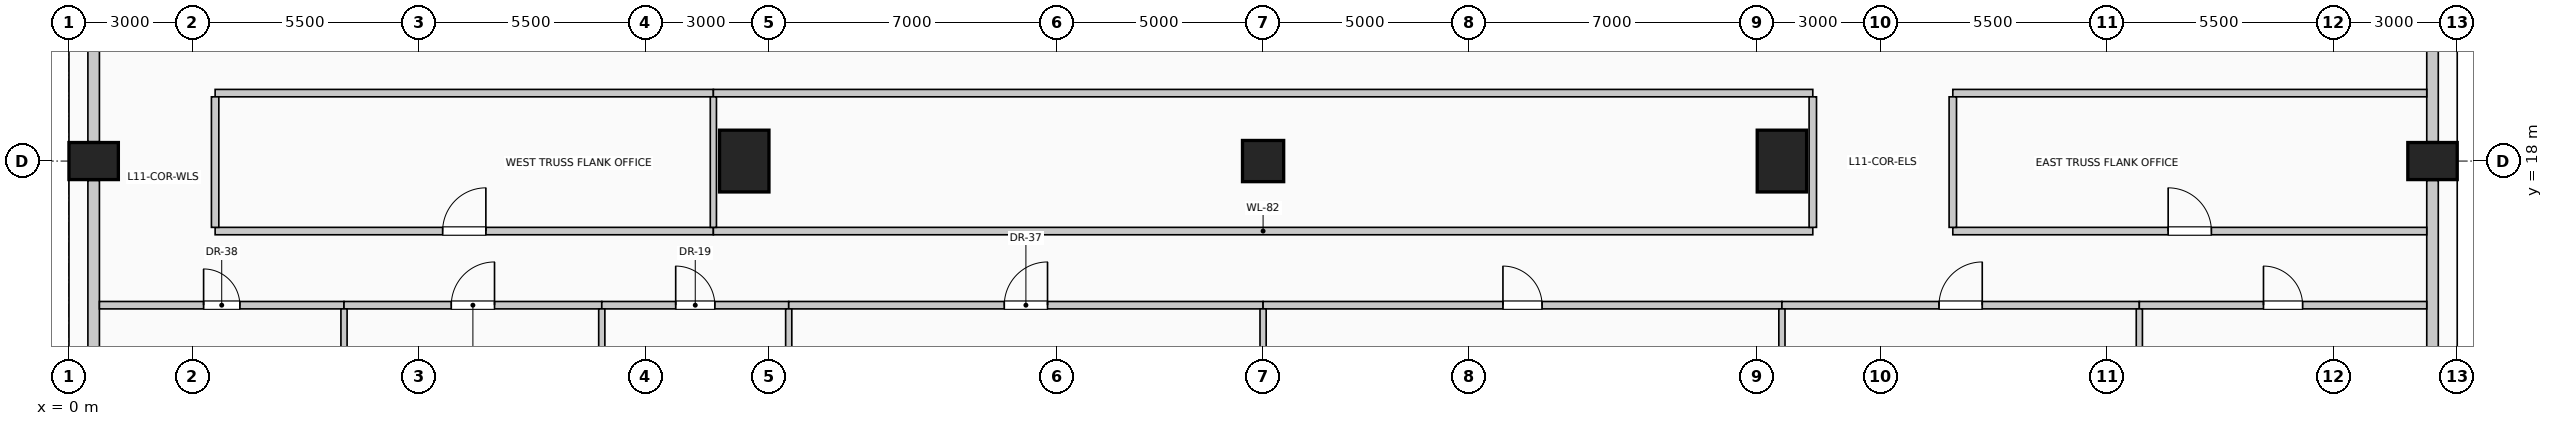
"""IFC4 building model, lengths in metres.
Left out: names, types, materials, properties, quantities, classifications, styles, units other than length and angle.
Written with IfcOpenShell. Run it as: python <this file> out.ifc"""

import sys

from ifc_helpers import new_model, si_unit, direction, frame, frame_2d, origin, origin_2d, place, context, subcontext, project, spatial, rectangle, circle, extrude, element, fill, save


model = new_model("IFC4")
c1 = context("Model", 3, precision=1e-05, world=origin(), true_north=direction((0.0, 1.0)))
c2 = subcontext(c1, "Body", "Model", "MODEL_VIEW")
j1 = project(units=[si_unit("LENGTHUNIT", "METRE"), si_unit("PLANEANGLEUNIT", "RADIAN")], contexts=[c1])
p1 = place(None, origin())
s1 = spatial("IfcSite", under=j1, at=p1, CompositionType="ELEMENT")
p2 = place(p1, origin())
s2 = spatial("IfcBuilding", under=s1, at=p2, CompositionType="ELEMENT")
p3 = place(p2, frame((0.0, 0.0, 46.6)))
s3 = spatial("IfcBuildingStorey", under=s2, at=p3, CompositionType="ELEMENT", Elevation=46.6)
for number, where, z_axis, x_axis in (
    (1, (0.6, 18.0, 0.0), (0.0, 0.0, 1.0), (0.0, 1.0, 0.0)),
    (2, (57.4, 18.0, 0.0), (0.0, 0.0, 1.0), (0.0, 1.0, 0.0)),
):
    element("IfcColumn", number, at=place(p3, frame(where, z_axis=z_axis, x_axis=x_axis)), inside=s3, PredefinedType="COLUMN", context=c2, shape_type="SweptSolid", body=[
        extrude(rectangle(XDim=0.9, YDim=1.2, at=origin_2d()), origin(), (0.0, 0.0, 1.0), 4.0),
    ])
for number, where, z_axis, x_axis in (
    (3, (16.4, 18.0, 0.0), (0.0, 0.0, 1.0), (1.0, 0.0, 0.0)),
    (4, (41.6, 18.0, 0.0), (0.0, 0.0, 1.0), (1.0, 0.0, 0.0)),
):
    element("IfcColumn", number, at=place(p3, frame(where, z_axis=z_axis, x_axis=x_axis)), inside=s3, PredefinedType="COLUMN", context=c2, shape_type="SweptSolid", body=[
        extrude(rectangle(XDim=1.2, YDim=1.5, at=origin_2d()), origin(), (0.0, 0.0, 1.0), 4.0),
    ])
p4 = place(p3, frame((29.0, 18.0, 0.0), z_axis=(0.0, 0.0, 1.0), x_axis=(1.0, 0.0, 0.0)))
e5 = element("IfcColumn", 5, at=p4, inside=s3, PredefinedType="COLUMN", context=c2, shape_type="SweptSolid", body=[
    extrude(circle(Radius=0.5, at=origin_2d()), origin(), (0.0, 0.0, 1.0), 4.0),
])
p5 = place(p3, frame((0.6, 10.47, 0.0), z_axis=(0.0, 0.0, 1.0), x_axis=(0.0, 1.0, 0.0)))
e6 = element("IfcWall", 6, at=p5, inside=s3, PredefinedType="SOLIDWALL", context=c2, shape_type="SweptSolid", body=[
    extrude(rectangle(XDim=7.06, YDim=0.28, at=frame_2d((3.53, 0.0))), origin(), (0.0, 0.0, 1.0), 2.85),
])
p6 = place(p5, frame((1.22, 0.0, 0.5)))
e7 = element("IfcOpeningElement", 7, at=p6, cuts=e6, PredefinedType="OPENING", context=c2, shape_type="SweptSolid", body=[
    extrude(rectangle(XDim=1.7, YDim=1.95, at=frame_2d((0.85, 0.975))), frame((0.0, 0.15, 0.0), z_axis=(0.0, -1.0, 0.0), x_axis=(1.0, 0.0, 0.0)), (0.0, 0.0, 1.0), 0.3),
])
p7 = place(p3, frame((0.6, 18.47, 0.0), z_axis=(0.0, 0.0, 1.0), x_axis=(0.0, 1.0, 0.0)))
e8 = element("IfcWall", 8, at=p7, inside=s3, PredefinedType="SOLIDWALL", context=c2, shape_type="SweptSolid", body=[
    extrude(rectangle(XDim=7.06, YDim=0.28, at=frame_2d((3.53, 0.0))), origin(), (0.0, 0.0, 1.0), 2.85),
])
p8 = place(p3, frame((57.4, 17.53, 0.0), z_axis=(0.0, 0.0, 1.0), x_axis=(0.0, -1.0, 0.0)))
e9 = element("IfcWall", 9, at=p8, inside=s3, PredefinedType="SOLIDWALL", context=c2, shape_type="SweptSolid", body=[
    extrude(rectangle(XDim=7.06, YDim=0.28, at=frame_2d((3.53, 0.0))), origin(), (0.0, 0.0, 1.0), 2.85),
])
p9 = place(p8, frame((4.14, 0.0, 0.5)))
e10 = element("IfcOpeningElement", 10, at=p9, cuts=e9, PredefinedType="OPENING", context=c2, shape_type="SweptSolid", body=[
    extrude(rectangle(XDim=1.7, YDim=1.95, at=frame_2d((0.85, 0.975))), frame((0.0, 0.15, 0.0), z_axis=(0.0, -1.0, 0.0), x_axis=(1.0, 0.0, 0.0)), (0.0, 0.0, 1.0), 0.3),
])
p10 = place(p3, frame((57.4, 25.53, 0.0), z_axis=(0.0, 0.0, 1.0), x_axis=(0.0, -1.0, 0.0)))
e11 = element("IfcWall", 11, at=p10, inside=s3, PredefinedType="SOLIDWALL", context=c2, shape_type="SweptSolid", body=[
    extrude(rectangle(XDim=7.06, YDim=0.28, at=frame_2d((3.53, 0.0))), origin(), (0.0, 0.0, 1.0), 2.85),
])
p11 = place(p3, frame((0.74, 14.5, 0.0), z_axis=(0.0, 0.0, 1.0), x_axis=(1.0, 0.0, 0.0)))
e12 = element("IfcWall", 12, at=p11, inside=s3, PredefinedType="PARTITIONING", context=c2, shape_type="SweptSolid", body=[
    extrude(rectangle(XDim=5.94, YDim=0.18, at=frame_2d((2.97, 0.0))), origin(), (0.0, 0.0, 1.0), 3.7),
])
p12 = place(p11, frame((2.53, 0.0, 0.0)))
e13 = element("IfcOpeningElement", 13, at=p12, cuts=e12, PredefinedType="OPENING", context=c2, shape_type="SweptSolid", body=[
    extrude(rectangle(XDim=0.88, YDim=2.1, at=frame_2d((0.44, 1.05))), frame((0.0, 0.1, 0.0), z_axis=(0.0, -1.0, 0.0), x_axis=(1.0, 0.0, 0.0)), (0.0, 0.0, 1.0), 0.2),
])
p13 = place(p3, frame((6.68, 14.5, 0.0), z_axis=(0.0, 0.0, 1.0), x_axis=(1.0, 0.0, 0.0)))
e14 = element("IfcWall", 14, at=p13, inside=s3, PredefinedType="PARTITIONING", context=c2, shape_type="SweptSolid", body=[
    extrude(rectangle(XDim=6.26, YDim=0.18, at=frame_2d((3.13, 0.0))), origin(), (0.0, 0.0, 1.0), 3.7),
])
p14 = place(p13, frame((2.605, 0.0, 0.0)))
e15 = element("IfcOpeningElement", 15, at=p14, cuts=e14, PredefinedType="OPENING", context=c2, shape_type="SweptSolid", body=[
    extrude(rectangle(XDim=1.05, YDim=2.15, at=frame_2d((0.525, 1.075))), frame((0.0, 0.1, 0.0), z_axis=(0.0, -1.0, 0.0), x_axis=(1.0, 0.0, 0.0)), (0.0, 0.0, 1.0), 0.2),
])
p15 = place(p3, frame((12.94, 14.5, 0.0), z_axis=(0.0, 0.0, 1.0), x_axis=(1.0, 0.0, 0.0)))
e16 = element("IfcWall", 16, at=p15, inside=s3, PredefinedType="PARTITIONING", context=c2, shape_type="SweptSolid", body=[
    extrude(rectangle(XDim=4.54, YDim=0.18, at=frame_2d((2.27, 0.0))), origin(), (0.0, 0.0, 1.0), 3.7),
])
p16 = place(p15, frame((1.795, 0.0, 0.0)))
e17 = element("IfcOpeningElement", 17, at=p16, cuts=e16, PredefinedType="OPENING", context=c2, shape_type="SweptSolid", body=[
    extrude(rectangle(XDim=0.95, YDim=2.15, at=frame_2d((0.475, 1.075))), frame((0.0, 0.1, 0.0), z_axis=(0.0, -1.0, 0.0), x_axis=(1.0, 0.0, 0.0)), (0.0, 0.0, 1.0), 0.2),
])
p17 = place(p3, frame((17.48, 14.5, 0.0), z_axis=(0.0, 0.0, 1.0), x_axis=(1.0, 0.0, 0.0)))
e18 = element("IfcWall", 18, at=p17, inside=s3, PredefinedType="PARTITIONING", context=c2, shape_type="SweptSolid", body=[
    extrude(rectangle(XDim=11.52, YDim=0.18, at=frame_2d((5.76, 0.0))), origin(), (0.0, 0.0, 1.0), 3.7),
])
p18 = place(p17, frame((5.235, 0.0, 0.0)))
e19 = element("IfcOpeningElement", 19, at=p18, cuts=e18, PredefinedType="OPENING", context=c2, shape_type="SweptSolid", body=[
    extrude(rectangle(XDim=1.05, YDim=2.15, at=frame_2d((0.525, 1.075))), frame((0.0, 0.1, 0.0), z_axis=(0.0, -1.0, 0.0), x_axis=(1.0, 0.0, 0.0)), (0.0, 0.0, 1.0), 0.2),
])
p19 = place(p3, frame((29.0, 14.5, 0.0), z_axis=(0.0, 0.0, 1.0), x_axis=(1.0, 0.0, 0.0)))
e20 = element("IfcWall", 20, at=p19, inside=s3, PredefinedType="PARTITIONING", context=c2, shape_type="SweptSolid", body=[
    extrude(rectangle(XDim=12.6, YDim=0.18, at=frame_2d((6.3, 0.0))), origin(), (0.0, 0.0, 1.0), 3.7),
])
p20 = place(p19, frame((5.825, 0.0, 0.0)))
e21 = element("IfcOpeningElement", 21, at=p20, cuts=e20, PredefinedType="OPENING", context=c2, shape_type="SweptSolid", body=[
    extrude(rectangle(XDim=0.95, YDim=2.15, at=frame_2d((0.475, 1.075))), frame((0.0, 0.1, 0.0), z_axis=(0.0, -1.0, 0.0), x_axis=(1.0, 0.0, 0.0)), (0.0, 0.0, 1.0), 0.2),
])
p21 = place(p3, frame((41.6, 14.5, 0.0), z_axis=(0.0, 0.0, 1.0), x_axis=(1.0, 0.0, 0.0)))
e22 = element("IfcWall", 22, at=p21, inside=s3, PredefinedType="PARTITIONING", context=c2, shape_type="SweptSolid", body=[
    extrude(rectangle(XDim=8.68, YDim=0.18, at=frame_2d((4.34, 0.0))), origin(), (0.0, 0.0, 1.0), 3.7),
])
p22 = place(p21, frame((3.815, 0.0, 0.0)))
e23 = element("IfcOpeningElement", 23, at=p22, cuts=e22, PredefinedType="OPENING", context=c2, shape_type="SweptSolid", body=[
    extrude(rectangle(XDim=1.05, YDim=2.15, at=frame_2d((0.525, 1.075))), frame((0.0, 0.1, 0.0), z_axis=(0.0, -1.0, 0.0), x_axis=(1.0, 0.0, 0.0)), (0.0, 0.0, 1.0), 0.2),
])
p23 = place(p3, frame((50.28, 14.5, 0.0), z_axis=(0.0, 0.0, 1.0), x_axis=(1.0, 0.0, 0.0)))
e24 = element("IfcWall", 24, at=p23, inside=s3, PredefinedType="PARTITIONING", context=c2, shape_type="SweptSolid", body=[
    extrude(rectangle(XDim=6.98, YDim=0.18, at=frame_2d((3.49, 0.0))), origin(), (0.0, 0.0, 1.0), 3.7),
])
p24 = place(p23, frame((3.015, 0.0, 0.0)))
e25 = element("IfcOpeningElement", 25, at=p24, cuts=e24, PredefinedType="OPENING", context=c2, shape_type="SweptSolid", body=[
    extrude(rectangle(XDim=0.95, YDim=2.15, at=frame_2d((0.475, 1.075))), frame((0.0, 0.1, 0.0), z_axis=(0.0, -1.0, 0.0), x_axis=(1.0, 0.0, 0.0)), (0.0, 0.0, 1.0), 0.2),
])
p25 = place(p3, frame((3.55, 16.3, 0.0), z_axis=(0.0, 0.0, 1.0), x_axis=(1.0, 0.0, 0.0)))
e26 = element("IfcWall", 26, at=p25, inside=s3, PredefinedType="PARTITIONING", context=c2, shape_type="SweptSolid", body=[
    extrude(rectangle(XDim=12.1, YDim=0.18, at=frame_2d((6.05, 0.0))), origin(), (0.0, 0.0, 1.0), 3.7),
])
p26 = place(p25, frame((5.525, 0.0, 0.0)))
e27 = element("IfcOpeningElement", 27, at=p26, cuts=e26, PredefinedType="OPENING", context=c2, shape_type="SweptSolid", body=[
    extrude(rectangle(XDim=1.05, YDim=2.15, at=frame_2d((0.525, 1.075))), frame((0.0, 0.1, 0.0), z_axis=(0.0, -1.0, 0.0), x_axis=(1.0, 0.0, 0.0)), (0.0, 0.0, 1.0), 0.2),
])
p27 = place(p3, frame((15.65, 16.3, 0.0), z_axis=(0.0, 0.0, 1.0), x_axis=(1.0, 0.0, 0.0)))
e28 = element("IfcWall", 28, at=p27, inside=s3, PredefinedType="PARTITIONING", context=c2, shape_type="SweptSolid", body=[
    extrude(rectangle(XDim=26.7, YDim=0.18, at=frame_2d((13.35, 0.0))), origin(), (0.0, 0.0, 1.0), 3.7),
])
p28 = place(p3, frame((45.75, 16.3, 0.0), z_axis=(0.0, 0.0, 1.0), x_axis=(1.0, 0.0, 0.0)))
e29 = element("IfcWall", 29, at=p28, inside=s3, PredefinedType="PARTITIONING", context=c2, shape_type="SweptSolid", body=[
    extrude(rectangle(XDim=11.51, YDim=0.18, at=frame_2d((5.755, 0.0))), origin(), (0.0, 0.0, 1.0), 3.7),
])
p29 = place(p28, frame((5.23, 0.0, 0.0)))
e30 = element("IfcOpeningElement", 30, at=p29, cuts=e29, PredefinedType="OPENING", context=c2, shape_type="SweptSolid", body=[
    extrude(rectangle(XDim=1.05, YDim=2.15, at=frame_2d((0.525, 1.075))), frame((0.0, 0.1, 0.0), z_axis=(0.0, -1.0, 0.0), x_axis=(1.0, 0.0, 0.0)), (0.0, 0.0, 1.0), 0.2),
])
p30 = place(p3, frame((3.55, 19.65, 0.0), z_axis=(0.0, 0.0, 1.0), x_axis=(1.0, 0.0, 0.0)))
e31 = element("IfcWall", 31, at=p30, inside=s3, PredefinedType="PARTITIONING", context=c2, shape_type="SweptSolid", body=[
    extrude(rectangle(XDim=12.1, YDim=0.18, at=frame_2d((6.05, 0.0))), origin(), (0.0, 0.0, 1.0), 3.7),
])
p31 = place(p3, frame((15.65, 19.65, 0.0), z_axis=(0.0, 0.0, 1.0), x_axis=(1.0, 0.0, 0.0)))
e32 = element("IfcWall", 32, at=p31, inside=s3, PredefinedType="PARTITIONING", context=c2, shape_type="SweptSolid", body=[
    extrude(rectangle(XDim=26.7, YDim=0.18, at=frame_2d((13.35, 0.0))), origin(), (0.0, 0.0, 1.0), 3.7),
])
p32 = place(p3, frame((45.75, 19.65, 0.0), z_axis=(0.0, 0.0, 1.0), x_axis=(1.0, 0.0, 0.0)))
e33 = element("IfcWall", 33, at=p32, inside=s3, PredefinedType="PARTITIONING", context=c2, shape_type="SweptSolid", body=[
    extrude(rectangle(XDim=11.51, YDim=0.18, at=frame_2d((5.755, 0.0))), origin(), (0.0, 0.0, 1.0), 3.7),
])
p33 = place(p3, frame((3.55, 16.39, 0.0), z_axis=(0.0, 0.0, 1.0), x_axis=(0.0, 1.0, 0.0)))
e34 = element("IfcWall", 34, at=p33, inside=s3, PredefinedType="PARTITIONING", context=c2, shape_type="SweptSolid", body=[
    extrude(rectangle(XDim=3.17, YDim=0.18, at=frame_2d((1.585, 0.0))), origin(), (0.0, 0.0, 1.0), 3.7),
])
for number, where, z_axis, x_axis in (
    (35, (6.68, 0.74, 0.0), (0.0, 0.0, 1.0), (0.0, 1.0, 0.0)),
    (36, (12.94, 0.74, 0.0), (0.0, 0.0, 1.0), (0.0, 1.0, 0.0)),
):
    element("IfcWall", number, at=place(p3, frame(where, z_axis=z_axis, x_axis=x_axis)), inside=s3, PredefinedType="PARTITIONING", context=c2, shape_type="SweptSolid", body=[
        extrude(rectangle(XDim=13.67, YDim=0.15, at=frame_2d((6.835, 0.0))), origin(), (0.0, 0.0, 1.0), 3.7),
    ])
p34 = place(p3, frame((15.65, 16.39, 0.0), z_axis=(0.0, 0.0, 1.0), x_axis=(0.0, 1.0, 0.0)))
e37 = element("IfcWall", 37, at=p34, inside=s3, PredefinedType="PARTITIONING", context=c2, shape_type="SweptSolid", body=[
    extrude(rectangle(XDim=3.17, YDim=0.15, at=frame_2d((1.585, 0.0))), origin(), (0.0, 0.0, 1.0), 3.7),
])
p35 = place(p3, frame((17.48, 0.74, 0.0), z_axis=(0.0, 0.0, 1.0), x_axis=(0.0, 1.0, 0.0)))
e38 = element("IfcWall", 38, at=p35, inside=s3, PredefinedType="PARTITIONING", context=c2, shape_type="SweptSolid", body=[
    extrude(rectangle(XDim=13.67, YDim=0.15, at=frame_2d((6.835, 0.0))), origin(), (0.0, 0.0, 1.0), 3.7),
])
p36 = place(p3, frame((29.0, 1.2, 0.0), z_axis=(0.0, 0.0, 1.0), x_axis=(0.0, 1.0, 0.0)))
e39 = element("IfcWall", 39, at=p36, inside=s3, PredefinedType="PARTITIONING", context=c2, shape_type="SweptSolid", body=[
    extrude(rectangle(XDim=13.21, YDim=0.15, at=frame_2d((6.605, 0.0))), origin(), (0.0, 0.0, 1.0), 2.995),
])
p37 = place(p3, frame((41.6, 10.75, 0.0), z_axis=(0.0, 0.0, 1.0), x_axis=(0.0, 1.0, 0.0)))
e40 = element("IfcWall", 40, at=p37, inside=s3, PredefinedType="PARTITIONING", context=c2, shape_type="SweptSolid", body=[
    extrude(rectangle(XDim=3.66, YDim=0.15, at=frame_2d((1.83, 0.0))), origin(), (0.0, 0.0, 1.0), 2.995),
])
for number, where, z_axis, x_axis in (
    (41, (42.35, 16.39, 0.0), (0.0, 0.0, 1.0), (0.0, 1.0, 0.0)),
    (42, (45.75, 16.39, 0.0), (0.0, 0.0, 1.0), (0.0, 1.0, 0.0)),
):
    element("IfcWall", number, at=place(p3, frame(where, z_axis=z_axis, x_axis=x_axis)), inside=s3, PredefinedType="PARTITIONING", context=c2, shape_type="SweptSolid", body=[
        extrude(rectangle(XDim=3.17, YDim=0.18, at=frame_2d((1.585, 0.0))), origin(), (0.0, 0.0, 1.0), 3.7),
    ])
p38 = place(p3, frame((50.28, 0.74, 0.0), z_axis=(0.0, 0.0, 1.0), x_axis=(0.0, 1.0, 0.0)))
e43 = element("IfcWall", 43, at=p38, inside=s3, PredefinedType="PARTITIONING", context=c2, shape_type="SweptSolid", body=[
    extrude(rectangle(XDim=13.67, YDim=0.15, at=frame_2d((6.835, 0.0))), origin(), (0.0, 0.0, 1.0), 3.7),
])
p39 = place(p12, origin())
e44 = element("IfcDoor", 44, at=p39, inside=s3, OperationType="SINGLE_SWING_LEFT", PredefinedType="DOOR", context=c2, shape_type="SweptSolid", body=[
    extrude(rectangle(XDim=0.88, YDim=2.1, at=frame_2d((0.44, 1.05))), frame((0.0, 0.025, 0.0), z_axis=(0.0, -1.0, 0.0), x_axis=(1.0, 0.0, 0.0)), (0.0, 0.0, 1.0), 0.05),
])
fill(e13, e44)
p40 = place(p14, origin())
e45 = element("IfcDoor", 45, at=p40, inside=s3, OperationType="SINGLE_SWING_RIGHT", PredefinedType="DOOR", context=c2, shape_type="SweptSolid", body=[
    extrude(rectangle(XDim=1.05, YDim=2.15, at=frame_2d((0.525, 1.075))), frame((0.0, 0.025, 0.0), z_axis=(0.0, -1.0, 0.0), x_axis=(1.0, 0.0, 0.0)), (0.0, 0.0, 1.0), 0.05),
])
fill(e15, e45)
p41 = place(p16, origin())
e46 = element("IfcDoor", 46, at=p41, inside=s3, OperationType="SINGLE_SWING_LEFT", PredefinedType="DOOR", context=c2, shape_type="SweptSolid", body=[
    extrude(rectangle(XDim=0.95, YDim=2.15, at=frame_2d((0.475, 1.075))), frame((0.0, 0.025, 0.0), z_axis=(0.0, -1.0, 0.0), x_axis=(1.0, 0.0, 0.0)), (0.0, 0.0, 1.0), 0.05),
])
fill(e17, e46)
p42 = place(p18, origin())
e47 = element("IfcDoor", 47, at=p42, inside=s3, OperationType="SINGLE_SWING_RIGHT", PredefinedType="DOOR", context=c2, shape_type="SweptSolid", body=[
    extrude(rectangle(XDim=1.05, YDim=2.15, at=frame_2d((0.525, 1.075))), frame((0.0, 0.025, 0.0), z_axis=(0.0, -1.0, 0.0), x_axis=(1.0, 0.0, 0.0)), (0.0, 0.0, 1.0), 0.05),
])
fill(e19, e47)
p43 = place(p20, origin())
e48 = element("IfcDoor", 48, at=p43, inside=s3, OperationType="SINGLE_SWING_LEFT", PredefinedType="DOOR", context=c2, shape_type="SweptSolid", body=[
    extrude(rectangle(XDim=0.95, YDim=2.15, at=frame_2d((0.475, 1.075))), frame((0.0, 0.025, 0.0), z_axis=(0.0, -1.0, 0.0), x_axis=(1.0, 0.0, 0.0)), (0.0, 0.0, 1.0), 0.05),
])
fill(e21, e48)
p44 = place(p22, origin())
e49 = element("IfcDoor", 49, at=p44, inside=s3, OperationType="SINGLE_SWING_RIGHT", PredefinedType="DOOR", context=c2, shape_type="SweptSolid", body=[
    extrude(rectangle(XDim=1.05, YDim=2.15, at=frame_2d((0.525, 1.075))), frame((0.0, 0.025, 0.0), z_axis=(0.0, -1.0, 0.0), x_axis=(1.0, 0.0, 0.0)), (0.0, 0.0, 1.0), 0.05),
])
fill(e23, e49)
p45 = place(p24, origin())
e50 = element("IfcDoor", 50, at=p45, inside=s3, OperationType="SINGLE_SWING_LEFT", PredefinedType="DOOR", context=c2, shape_type="SweptSolid", body=[
    extrude(rectangle(XDim=0.95, YDim=2.15, at=frame_2d((0.475, 1.075))), frame((0.0, 0.025, 0.0), z_axis=(0.0, -1.0, 0.0), x_axis=(1.0, 0.0, 0.0)), (0.0, 0.0, 1.0), 0.05),
])
fill(e25, e50)
p46 = place(p26, origin())
e51 = element("IfcDoor", 51, at=p46, inside=s3, OperationType="SINGLE_SWING_RIGHT", PredefinedType="DOOR", context=c2, shape_type="SweptSolid", body=[
    extrude(rectangle(XDim=1.05, YDim=2.15, at=frame_2d((0.525, 1.075))), frame((0.0, 0.025, 0.0), z_axis=(0.0, -1.0, 0.0), x_axis=(1.0, 0.0, 0.0)), (0.0, 0.0, 1.0), 0.05),
])
fill(e27, e51)
p47 = place(p29, origin())
e52 = element("IfcDoor", 52, at=p47, inside=s3, OperationType="SINGLE_SWING_LEFT", PredefinedType="DOOR", context=c2, shape_type="SweptSolid", body=[
    extrude(rectangle(XDim=1.05, YDim=2.15, at=frame_2d((0.525, 1.075))), frame((0.0, 0.025, 0.0), z_axis=(0.0, -1.0, 0.0), x_axis=(1.0, 0.0, 0.0)), (0.0, 0.0, 1.0), 0.05),
])
fill(e30, e52)
save(model, sys.argv[1])
